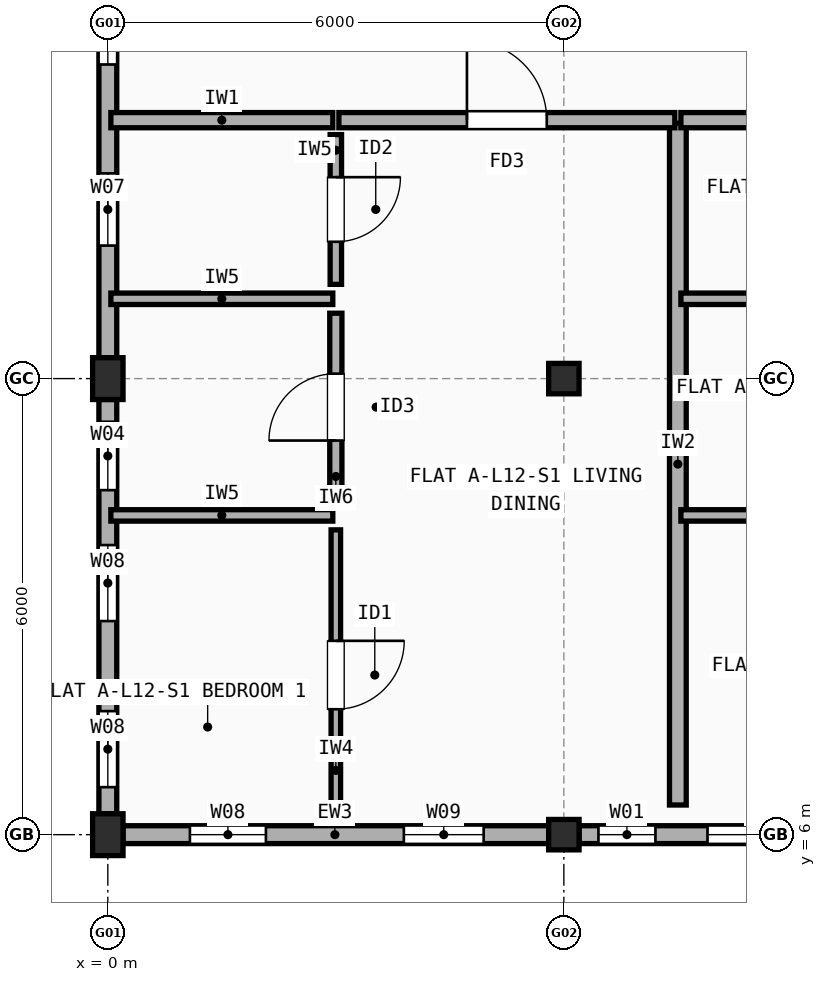
"""IFC4 building model, lengths in metres.
Left out: names, types, materials, properties, quantities, classifications, styles, units other than length and angle.
Written with IfcOpenShell. Run it as: python <this file> out.ifc"""

import sys

from ifc_helpers import new_model, si_unit, direction, frame, frame_2d, origin, origin_2d, place, context, subcontext, project, spatial, rectangle, extrude, element, fill, save


model = new_model("IFC4")
c1 = context("Model", 3, precision=1e-05, world=origin(), true_north=direction((0.0, 1.0)))
c2 = subcontext(c1, "Body", "Model", "MODEL_VIEW")
j1 = project(units=[si_unit("LENGTHUNIT", "METRE"), si_unit("PLANEANGLEUNIT", "RADIAN")], contexts=[c1])
p1 = place(None, origin())
s1 = spatial("IfcSite", under=j1, at=p1, CompositionType="ELEMENT")
p2 = place(p1, origin())
s2 = spatial("IfcBuilding", under=s1, at=p2, CompositionType="ELEMENT")
p3 = place(p2, frame((0.0, 0.0, 39.7)))
s3 = spatial("IfcBuildingStorey", under=s2, at=p3, CompositionType="ELEMENT", Elevation=39.7)
for number, where, z_axis, x_axis in (
    (1, (0.0, 6.0, 0.0), (0.0, 0.0, 1.0), (1.0, 0.0, 0.0)),
    (2, (0.0, 12.0, 0.0), (0.0, 0.0, 1.0), (1.0, 0.0, 0.0)),
):
    element("IfcColumn", number, at=place(p3, frame(where, z_axis=z_axis, x_axis=x_axis)), inside=s3, PredefinedType="COLUMN", context=c2, shape_type="SweptSolid", body=[
        extrude(rectangle(XDim=0.4, YDim=0.55, at=origin_2d()), origin(), (0.0, 0.0, 1.0), 3.0),
    ])
for number, where, z_axis, x_axis in (
    (3, (6.0, 6.0, 0.0), (0.0, 0.0, 1.0), (1.0, 0.0, 0.0)),
    (4, (6.0, 12.0, 0.0), (0.0, 0.0, 1.0), (1.0, 0.0, 0.0)),
):
    element("IfcColumn", number, at=place(p3, frame(where, z_axis=z_axis, x_axis=x_axis)), inside=s3, PredefinedType="COLUMN", context=c2, shape_type="SweptSolid", body=[
        extrude(rectangle(XDim=0.4, YDim=0.4, at=origin_2d()), origin(), (0.0, 0.0, 1.0), 3.0),
    ])
p4 = place(p3, frame((0.2, 6.0, 0.0), z_axis=(0.0, 0.0, 1.0), x_axis=(1.0, 0.0, 0.0)))
e5 = element("IfcWall", 5, at=p4, inside=s3, PredefinedType="STANDARD", context=c2, shape_type="SweptSolid", body=[
    extrude(rectangle(XDim=5.6, YDim=0.235, at=frame_2d((2.8, 0.0))), origin(), (0.0, 0.0, 1.0), 2.482),
])
p5 = place(p4, frame((0.88, 0.0, 0.9)))
e6 = element("IfcOpeningElement", 6, at=p5, cuts=e5, PredefinedType="OPENING", context=c2, shape_type="SweptSolid", body=[
    extrude(rectangle(XDim=1.0, YDim=1.4, at=frame_2d((0.5, 0.7))), frame((0.0, 0.127, 0.0), z_axis=(0.0, -1.0, 0.0), x_axis=(1.0, 0.0, 0.0)), (0.0, 0.0, 1.0), 0.255),
])
p6 = place(p4, frame((3.695, 0.0, 0.9)))
e7 = element("IfcOpeningElement", 7, at=p6, cuts=e5, PredefinedType="OPENING", context=c2, shape_type="SweptSolid", body=[
    extrude(rectangle(XDim=1.05, YDim=1.35, at=frame_2d((0.525, 0.675))), frame((0.0, 0.127, 0.0), z_axis=(0.0, -1.0, 0.0), x_axis=(1.0, 0.0, 0.0)), (0.0, 0.0, 1.0), 0.255),
])
p7 = place(p3, frame((6.2, 6.0, 0.0), z_axis=(0.0, 0.0, 1.0), x_axis=(1.0, 0.0, 0.0)))
e8 = element("IfcWall", 8, at=p7, inside=s3, PredefinedType="STANDARD", context=c2, shape_type="SweptSolid", body=[
    extrude(rectangle(XDim=5.6, YDim=0.235, at=frame_2d((2.8, 0.0))), origin(), (0.0, 0.0, 1.0), 2.482),
])
p8 = place(p7, frame((0.255, 0.0, 0.9)))
e9 = element("IfcOpeningElement", 9, at=p8, cuts=e8, PredefinedType="OPENING", context=c2, shape_type="SweptSolid", body=[
    extrude(rectangle(XDim=0.75, YDim=1.15, at=frame_2d((0.375, 0.575))), frame((0.0, 0.127, 0.0), z_axis=(0.0, -1.0, 0.0), x_axis=(1.0, 0.0, 0.0)), (0.0, 0.0, 1.0), 0.255),
])
p9 = place(p7, frame((1.69, 0.0, 0.9)))
e10 = element("IfcOpeningElement", 10, at=p9, cuts=e8, PredefinedType="OPENING", context=c2, shape_type="SweptSolid", body=[
    extrude(rectangle(XDim=1.5, YDim=1.4, at=frame_2d((0.75, 0.7))), frame((0.0, 0.127, 0.0), z_axis=(0.0, -1.0, 0.0), x_axis=(1.0, 0.0, 0.0)), (0.0, 0.0, 1.0), 0.255),
])
p10 = place(p7, frame((3.75, 0.0, 0.9)))
e11 = element("IfcOpeningElement", 11, at=p10, cuts=e8, PredefinedType="OPENING", context=c2, shape_type="SweptSolid", body=[
    extrude(rectangle(XDim=1.5, YDim=1.4, at=frame_2d((0.75, 0.7))), frame((0.0, 0.127, 0.0), z_axis=(0.0, -1.0, 0.0), x_axis=(1.0, 0.0, 0.0)), (0.0, 0.0, 1.0), 0.255),
])
p11 = place(p3, frame((0.0, 17.725, 0.0), z_axis=(0.0, 0.0, 1.0), x_axis=(0.0, -1.0, 0.0)))
e12 = element("IfcWall", 12, at=p11, inside=s3, PredefinedType="STANDARD", context=c2, shape_type="SweptSolid", body=[
    extrude(rectangle(XDim=5.45, YDim=0.235, at=frame_2d((2.725, 0.0))), origin(), (0.0, 0.0, 1.0), 2.482),
])
p12 = place(p11, frame((0.692, 0.0, 0.9)))
e13 = element("IfcOpeningElement", 13, at=p12, cuts=e12, PredefinedType="OPENING", context=c2, shape_type="SweptSolid", body=[
    extrude(rectangle(XDim=0.9, YDim=1.4, at=frame_2d((0.45, 0.7))), frame((0.0, 0.127, 0.0), z_axis=(0.0, -1.0, 0.0), x_axis=(1.0, 0.0, 0.0)), (0.0, 0.0, 1.0), 0.255),
])
p13 = place(p11, frame((3.025, 0.0, 0.9)))
e14 = element("IfcOpeningElement", 14, at=p13, cuts=e12, PredefinedType="OPENING", context=c2, shape_type="SweptSolid", body=[
    extrude(rectangle(XDim=0.95, YDim=1.35, at=frame_2d((0.475, 0.675))), frame((0.0, 0.127, 0.0), z_axis=(0.0, -1.0, 0.0), x_axis=(1.0, 0.0, 0.0)), (0.0, 0.0, 1.0), 0.255),
])
p14 = place(p3, frame((0.0, 11.725, 0.0), z_axis=(0.0, 0.0, 1.0), x_axis=(0.0, -1.0, 0.0)))
e15 = element("IfcWall", 15, at=p14, inside=s3, PredefinedType="STANDARD", context=c2, shape_type="SweptSolid", body=[
    extrude(rectangle(XDim=5.45, YDim=0.235, at=frame_2d((2.725, 0.0))), origin(), (0.0, 0.0, 1.0), 2.482),
])
p15 = place(p14, frame((0.292, 0.0, 0.9)))
e16 = element("IfcOpeningElement", 16, at=p15, cuts=e15, PredefinedType="OPENING", context=c2, shape_type="SweptSolid", body=[
    extrude(rectangle(XDim=0.9, YDim=1.3, at=frame_2d((0.45, 0.65))), frame((0.0, 0.127, 0.0), z_axis=(0.0, -1.0, 0.0), x_axis=(1.0, 0.0, 0.0)), (0.0, 0.0, 1.0), 0.255),
])
p16 = place(p14, frame((1.915, 0.0, 0.9)))
e17 = element("IfcOpeningElement", 17, at=p16, cuts=e15, PredefinedType="OPENING", context=c2, shape_type="SweptSolid", body=[
    extrude(rectangle(XDim=1.0, YDim=1.4, at=frame_2d((0.5, 0.7))), frame((0.0, 0.127, 0.0), z_axis=(0.0, -1.0, 0.0), x_axis=(1.0, 0.0, 0.0)), (0.0, 0.0, 1.0), 0.255),
])
p17 = place(p14, frame((4.1, 0.0, 0.9)))
e18 = element("IfcOpeningElement", 18, at=p17, cuts=e15, PredefinedType="OPENING", context=c2, shape_type="SweptSolid", body=[
    extrude(rectangle(XDim=1.0, YDim=1.4, at=frame_2d((0.5, 0.7))), frame((0.0, 0.127, 0.0), z_axis=(0.0, -1.0, 0.0), x_axis=(1.0, 0.0, 0.0)), (0.0, 0.0, 1.0), 0.255),
])
p18 = place(p3, frame((7.5, 6.39, 0.0), z_axis=(0.0, 0.0, 1.0), x_axis=(0.0, 1.0, 0.0)))
e19 = element("IfcWall", 19, at=p18, inside=s3, PredefinedType="SOLIDWALL", context=c2, shape_type="SweptSolid", body=[
    extrude(rectangle(XDim=8.97, YDim=0.22, at=frame_2d((4.485, 0.0))), origin(), (0.0, 0.0, 1.0), 2.532),
])
p19 = place(p3, frame((0.04, 15.4, 0.0), z_axis=(0.0, 0.0, 1.0), x_axis=(1.0, 0.0, 0.0)))
e20 = element("IfcWall", 20, at=p19, inside=s3, PredefinedType="SOLIDWALL", context=c2, shape_type="SweptSolid", body=[
    extrude(rectangle(XDim=2.92, YDim=0.2, at=frame_2d((1.46, 0.0))), origin(), (0.0, 0.0, 1.0), 2.482),
])
p20 = place(p3, frame((3.04, 15.4, 0.0), z_axis=(0.0, 0.0, 1.0), x_axis=(1.0, 0.0, 0.0)))
e21 = element("IfcWall", 21, at=p20, inside=s3, PredefinedType="SOLIDWALL", context=c2, shape_type="SweptSolid", body=[
    extrude(rectangle(XDim=4.42, YDim=0.2, at=frame_2d((2.21, 0.0))), origin(), (0.0, 0.0, 1.0), 2.458),
])
p21 = place(p20, frame((1.685, 0.0, 0.0)))
e22 = element("IfcOpeningElement", 22, at=p21, cuts=e21, PredefinedType="OPENING", context=c2, shape_type="SweptSolid", body=[
    extrude(rectangle(XDim=1.05, YDim=2.15, at=frame_2d((0.525, 1.075))), frame((0.0, 0.11, 0.0), z_axis=(0.0, -1.0, 0.0), x_axis=(1.0, 0.0, 0.0)), (0.0, 0.0, 1.0), 0.22),
])
p22 = place(p3, frame((3.0, 6.19, 0.0), z_axis=(0.0, 0.0, 1.0), x_axis=(0.0, 1.0, 0.0)))
e23 = element("IfcWall", 23, at=p22, inside=s3, PredefinedType="PARTITIONING", context=c2, shape_type="SweptSolid", body=[
    extrude(rectangle(XDim=3.82, YDim=0.125, at=frame_2d((1.91, 0.0))), origin(), (0.0, 0.0, 1.0), 3.0),
])
p23 = place(p22, frame((1.46, 0.0, 0.0)))
e24 = element("IfcOpeningElement", 24, at=p23, cuts=e23, PredefinedType="OPENING", context=c2, shape_type="SweptSolid", body=[
    extrude(rectangle(XDim=0.9, YDim=2.1, at=frame_2d((0.45, 1.05))), frame((0.0, 0.073, 0.0), z_axis=(0.0, -1.0, 0.0), x_axis=(1.0, 0.0, 0.0)), (0.0, 0.0, 1.0), 0.145),
])
p24 = place(p3, frame((3.0, 10.39, 0.0), z_axis=(0.0, 0.0, 1.0), x_axis=(0.0, 1.0, 0.0)))
e25 = element("IfcWall", 25, at=p24, inside=s3, PredefinedType="PLUMBINGWALL", context=c2, shape_type="SweptSolid", body=[
    extrude(rectangle(XDim=2.47, YDim=0.16, at=frame_2d((1.235, 0.0))), origin(), (0.0, 0.0, 1.0), 2.532),
])
p25 = place(p24, frame((0.795, 0.0, 0.0)))
e26 = element("IfcOpeningElement", 26, at=p25, cuts=e25, PredefinedType="OPENING", context=c2, shape_type="SweptSolid", body=[
    extrude(rectangle(XDim=0.88, YDim=2.1, at=frame_2d((0.44, 1.05))), frame((0.0, 0.09, 0.0), z_axis=(0.0, -1.0, 0.0), x_axis=(1.0, 0.0, 0.0)), (0.0, 0.0, 1.0), 0.18),
])
p26 = place(p3, frame((3.0, 13.24, 0.0), z_axis=(0.0, 0.0, 1.0), x_axis=(0.0, 1.0, 0.0)))
e27 = element("IfcWall", 27, at=p26, inside=s3, PredefinedType="PARTITIONING", context=c2, shape_type="SweptSolid", body=[
    extrude(rectangle(XDim=1.97, YDim=0.15, at=frame_2d((0.985, 0.0))), origin(), (0.0, 0.0, 1.0), 3.0),
])
p27 = place(p26, frame((0.56, 0.0, 0.0)))
e28 = element("IfcOpeningElement", 28, at=p27, cuts=e27, PredefinedType="OPENING", context=c2, shape_type="SweptSolid", body=[
    extrude(rectangle(XDim=0.85, YDim=2.1, at=frame_2d((0.425, 1.05))), frame((0.0, 0.085, 0.0), z_axis=(0.0, -1.0, 0.0), x_axis=(1.0, 0.0, 0.0)), (0.0, 0.0, 1.0), 0.17),
])
for number, where, z_axis, x_axis in (
    (29, (0.04, 10.2, 0.0), (0.0, 0.0, 1.0), (1.0, 0.0, 0.0)),
    (30, (0.04, 13.05, 0.0), (0.0, 0.0, 1.0), (1.0, 0.0, 0.0)),
):
    element("IfcWall", number, at=place(p3, frame(where, z_axis=z_axis, x_axis=x_axis)), inside=s3, PredefinedType="PARTITIONING", context=c2, shape_type="SweptSolid", body=[
        extrude(rectangle(XDim=2.92, YDim=0.15, at=frame_2d((1.46, 0.0))), origin(), (0.0, 0.0, 1.0), 2.482),
    ])
p28 = place(p3, frame((7.54, 15.4, 0.0), z_axis=(0.0, 0.0, 1.0), x_axis=(1.0, 0.0, 0.0)))
e31 = element("IfcWall", 31, at=p28, inside=s3, PredefinedType="SOLIDWALL", context=c2, shape_type="SweptSolid", body=[
    extrude(rectangle(XDim=4.42, YDim=0.2, at=frame_2d((2.21, 0.0))), origin(), (0.0, 0.0, 1.0), 2.458),
])
p29 = place(p3, frame((7.54, 10.2, 0.0), z_axis=(0.0, 0.0, 1.0), x_axis=(1.0, 0.0, 0.0)))
e32 = element("IfcWall", 32, at=p29, inside=s3, PredefinedType="PARTITIONING", context=c2, shape_type="SweptSolid", body=[
    extrude(rectangle(XDim=4.42, YDim=0.15, at=frame_2d((2.21, 0.0))), origin(), (0.0, 0.0, 1.0), 2.508),
])
p30 = place(p3, frame((7.54, 13.05, 0.0), z_axis=(0.0, 0.0, 1.0), x_axis=(1.0, 0.0, 0.0)))
e33 = element("IfcWall", 33, at=p30, inside=s3, PredefinedType="PARTITIONING", context=c2, shape_type="SweptSolid", body=[
    extrude(rectangle(XDim=4.42, YDim=0.15, at=frame_2d((2.21, 0.0))), origin(), (0.0, 0.0, 1.0), 2.458),
])
p31 = place(p5, origin())
e34 = element("IfcWindow", 34, at=p31, inside=s3, PartitioningType="SINGLE_PANEL", PredefinedType="WINDOW", context=c2, shape_type="SweptSolid", body=[
    extrude(rectangle(XDim=1.0, YDim=1.4, at=frame_2d((0.5, 0.7))), frame((0.0, 0.03, 0.0), z_axis=(0.0, -1.0, 0.0), x_axis=(1.0, 0.0, 0.0)), (0.0, 0.0, 1.0), 0.06),
])
fill(e6, e34)
p32 = place(p6, origin())
e35 = element("IfcWindow", 35, at=p32, inside=s3, PartitioningType="SINGLE_PANEL", PredefinedType="WINDOW", context=c2, shape_type="SweptSolid", body=[
    extrude(rectangle(XDim=1.05, YDim=1.35, at=frame_2d((0.525, 0.675))), frame((0.0, 0.03, 0.0), z_axis=(0.0, -1.0, 0.0), x_axis=(1.0, 0.0, 0.0)), (0.0, 0.0, 1.0), 0.06),
])
fill(e7, e35)
p33 = place(p8, origin())
e36 = element("IfcWindow", 36, at=p33, inside=s3, PartitioningType="SINGLE_PANEL", PredefinedType="WINDOW", context=c2, shape_type="SweptSolid", body=[
    extrude(rectangle(XDim=0.75, YDim=1.15, at=frame_2d((0.375, 0.575))), frame((0.0, 0.03, 0.0), z_axis=(0.0, -1.0, 0.0), x_axis=(1.0, 0.0, 0.0)), (0.0, 0.0, 1.0), 0.06),
])
fill(e9, e36)
p34 = place(p9, origin())
e37 = element("IfcWindow", 37, at=p34, inside=s3, PartitioningType="SINGLE_PANEL", PredefinedType="WINDOW", context=c2, shape_type="SweptSolid", body=[
    extrude(rectangle(XDim=1.5, YDim=1.4, at=frame_2d((0.75, 0.7))), frame((0.0, 0.03, 0.0), z_axis=(0.0, -1.0, 0.0), x_axis=(1.0, 0.0, 0.0)), (0.0, 0.0, 1.0), 0.06),
])
fill(e10, e37)
p35 = place(p12, origin())
e38 = element("IfcWindow", 38, at=p35, inside=s3, PartitioningType="SINGLE_PANEL", PredefinedType="WINDOW", context=c2, shape_type="SweptSolid", body=[
    extrude(rectangle(XDim=0.9, YDim=1.4, at=frame_2d((0.45, 0.7))), frame((0.0, 0.03, 0.0), z_axis=(0.0, -1.0, 0.0), x_axis=(1.0, 0.0, 0.0)), (0.0, 0.0, 1.0), 0.06),
])
fill(e13, e38)
p36 = place(p13, origin())
e39 = element("IfcWindow", 39, at=p36, inside=s3, PartitioningType="SINGLE_PANEL", PredefinedType="WINDOW", context=c2, shape_type="SweptSolid", body=[
    extrude(rectangle(XDim=0.95, YDim=1.35, at=frame_2d((0.475, 0.675))), frame((0.0, 0.03, 0.0), z_axis=(0.0, -1.0, 0.0), x_axis=(1.0, 0.0, 0.0)), (0.0, 0.0, 1.0), 0.06),
])
fill(e14, e39)
p37 = place(p15, origin())
e40 = element("IfcWindow", 40, at=p37, inside=s3, PartitioningType="SINGLE_PANEL", PredefinedType="WINDOW", context=c2, shape_type="SweptSolid", body=[
    extrude(rectangle(XDim=0.9, YDim=1.3, at=frame_2d((0.45, 0.65))), frame((0.0, 0.03, 0.0), z_axis=(0.0, -1.0, 0.0), x_axis=(1.0, 0.0, 0.0)), (0.0, 0.0, 1.0), 0.06),
])
fill(e16, e40)
p38 = place(p16, origin())
e41 = element("IfcWindow", 41, at=p38, inside=s3, PartitioningType="SINGLE_PANEL", PredefinedType="WINDOW", context=c2, shape_type="SweptSolid", body=[
    extrude(rectangle(XDim=1.0, YDim=1.4, at=frame_2d((0.5, 0.7))), frame((0.0, 0.03, 0.0), z_axis=(0.0, -1.0, 0.0), x_axis=(1.0, 0.0, 0.0)), (0.0, 0.0, 1.0), 0.06),
])
fill(e17, e41)
p39 = place(p17, origin())
e42 = element("IfcWindow", 42, at=p39, inside=s3, PartitioningType="SINGLE_PANEL", PredefinedType="WINDOW", context=c2, shape_type="SweptSolid", body=[
    extrude(rectangle(XDim=1.0, YDim=1.4, at=frame_2d((0.5, 0.7))), frame((0.0, 0.03, 0.0), z_axis=(0.0, -1.0, 0.0), x_axis=(1.0, 0.0, 0.0)), (0.0, 0.0, 1.0), 0.06),
])
fill(e18, e42)
p40 = place(p21, origin())
e43 = element("IfcDoor", 43, at=p40, inside=s3, OperationType="SINGLE_SWING_LEFT", PredefinedType="DOOR", context=c2, shape_type="SweptSolid", body=[
    extrude(rectangle(XDim=1.05, YDim=2.15, at=frame_2d((0.525, 1.075))), frame((0.0, 0.025, 0.0), z_axis=(0.0, -1.0, 0.0), x_axis=(1.0, 0.0, 0.0)), (0.0, 0.0, 1.0), 0.05),
])
fill(e22, e43)
p41 = place(p23, origin())
e44 = element("IfcDoor", 44, at=p41, inside=s3, OperationType="SINGLE_SWING_RIGHT", PredefinedType="DOOR", context=c2, shape_type="SweptSolid", body=[
    extrude(rectangle(XDim=0.9, YDim=2.1, at=frame_2d((0.45, 1.05))), frame((0.0, 0.025, 0.0), z_axis=(0.0, -1.0, 0.0), x_axis=(1.0, 0.0, 0.0)), (0.0, 0.0, 1.0), 0.05),
])
fill(e24, e44)
p42 = place(p25, origin())
e45 = element("IfcDoor", 45, at=p42, inside=s3, OperationType="SINGLE_SWING_LEFT", PredefinedType="DOOR", context=c2, shape_type="SweptSolid", body=[
    extrude(rectangle(XDim=0.88, YDim=2.1, at=frame_2d((0.44, 1.05))), frame((0.0, 0.025, 0.0), z_axis=(0.0, -1.0, 0.0), x_axis=(1.0, 0.0, 0.0)), (0.0, 0.0, 1.0), 0.05),
])
fill(e26, e45)
p43 = place(p27, origin())
e46 = element("IfcDoor", 46, at=p43, inside=s3, OperationType="SINGLE_SWING_RIGHT", PredefinedType="DOOR", context=c2, shape_type="SweptSolid", body=[
    extrude(rectangle(XDim=0.85, YDim=2.1, at=frame_2d((0.425, 1.05))), frame((0.0, 0.025, 0.0), z_axis=(0.0, -1.0, 0.0), x_axis=(1.0, 0.0, 0.0)), (0.0, 0.0, 1.0), 0.05),
])
fill(e28, e46)
save(model, sys.argv[1])
